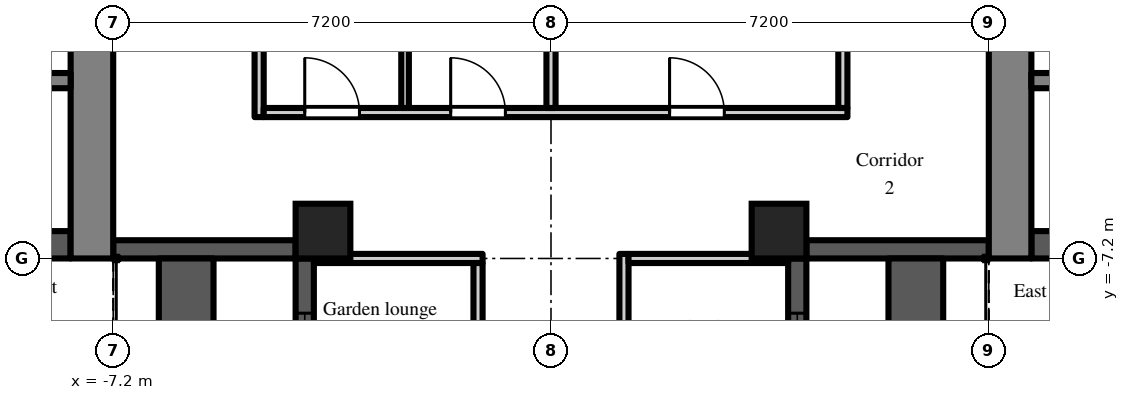
"""IFC4 building model, lengths in metres.
Left out: names, types, materials, properties, quantities, classifications, styles, units other than length and angle.
Written with IfcOpenShell. Run it as: python <this file> out.ifc"""

import sys

from ifc_helpers import new_model, si_unit, direction, frame, frame_2d, origin, origin_2d, place, context, subcontext, project, spatial, rectangle, extrude, element, fill, save


model = new_model("IFC4")
c1 = context("Model", 3, precision=1e-05, world=origin(), true_north=direction((0.0, 1.0)))
c2 = subcontext(c1, "Body", "Model", "MODEL_VIEW")
j1 = project(units=[si_unit("LENGTHUNIT", "METRE"), si_unit("PLANEANGLEUNIT", "RADIAN")], contexts=[c1])
p1 = place(None, origin())
s1 = spatial("IfcSite", under=j1, at=p1, CompositionType="ELEMENT")
p2 = place(p1, origin())
s2 = spatial("IfcBuilding", under=s1, at=p2, CompositionType="ELEMENT")
p3 = place(p2, frame((0.0, 0.0, 159.3)))
s3 = spatial("IfcBuildingStorey", under=s2, at=p3, CompositionType="ELEMENT", Elevation=159.3)
for number, where, z_axis, x_axis in (
    (1, (-3.75, -6.75, 0.0), (0.0, 0.0, 1.0), (1.0, 0.0, 0.0)),
    (2, (3.75, -6.75, 0.0), (0.0, 0.0, 1.0), (1.0, 0.0, 0.0)),
):
    element("IfcColumn", number, at=place(p3, frame(where, z_axis=z_axis, x_axis=x_axis)), inside=s3, PredefinedType="COLUMN", context=c2, shape_type="SweptSolid", body=[
        extrude(rectangle(XDim=0.9, YDim=0.9, at=origin_2d()), origin(), (0.0, 0.0, 1.0), 3.0),
    ])
p4 = place(p3, frame((-7.2, -7.05, 0.0), z_axis=(0.0, 0.0, 1.0), x_axis=(1.0, 0.0, 0.0)))
e3 = element("IfcWall", 3, at=p4, inside=s3, PredefinedType="SOLIDWALL", context=c2, shape_type="SweptSolid", body=[
    extrude(rectangle(XDim=3.0, YDim=0.3, at=frame_2d((1.5, 0.0))), origin(), (0.0, 0.0, 1.0), 2.55),
])
p5 = place(p3, frame((-4.05, -7.2, 0.0), z_axis=(0.0, 0.0, 1.0), x_axis=(0.0, -1.0, 0.0)))
e4 = element("IfcWall", 4, at=p5, inside=s3, PredefinedType="SOLIDWALL", context=c2, shape_type="SweptSolid", body=[
    extrude(rectangle(XDim=7.2, YDim=0.3, at=frame_2d((3.6, 0.0))), origin(), (0.0, 0.0, 1.0), 2.55),
])
p6 = place(p5, frame((3.0, 0.0, 0.0)))
e5 = element("IfcOpeningElement", 5, at=p6, cuts=e4, PredefinedType="OPENING", context=c2, shape_type="SweptSolid", body=[
    extrude(rectangle(XDim=1.2, YDim=2.05, at=frame_2d((0.6, 1.025))), frame((0.0, 0.16, 0.0), z_axis=(0.0, -1.0, 0.0), x_axis=(1.0, 0.0, 0.0)), (0.0, 0.0, 1.0), 0.32),
])
p7 = place(p5, frame((0.9, 0.0, 0.2)))
e6 = element("IfcOpeningElement", 6, at=p7, cuts=e4, PredefinedType="OPENING", context=c2, shape_type="SweptSolid", body=[
    extrude(rectangle(XDim=1.8, YDim=1.85, at=frame_2d((0.9, 0.925))), frame((0.0, 0.16, 0.0), z_axis=(0.0, -1.0, 0.0), x_axis=(1.0, 0.0, 0.0)), (0.0, 0.0, 1.0), 0.32),
])
p8 = place(p5, frame((4.5, 0.0, 0.2)))
e7 = element("IfcOpeningElement", 7, at=p8, cuts=e4, PredefinedType="OPENING", context=c2, shape_type="SweptSolid", body=[
    extrude(rectangle(XDim=1.8, YDim=1.85, at=frame_2d((0.9, 0.925))), frame((0.0, 0.16, 0.0), z_axis=(0.0, -1.0, 0.0), x_axis=(1.0, 0.0, 0.0)), (0.0, 0.0, 1.0), 0.32),
])
p9 = place(p3, frame((4.05, -14.4, 0.0), z_axis=(0.0, 0.0, 1.0), x_axis=(0.0, 1.0, 0.0)))
e8 = element("IfcWall", 8, at=p9, inside=s3, PredefinedType="SOLIDWALL", context=c2, shape_type="SweptSolid", body=[
    extrude(rectangle(XDim=7.2, YDim=0.3, at=frame_2d((3.6, 0.0))), origin(), (0.0, 0.0, 1.0), 2.55),
])
p10 = place(p9, frame((3.0, 0.0, 0.0)))
e9 = element("IfcOpeningElement", 9, at=p10, cuts=e8, PredefinedType="OPENING", context=c2, shape_type="SweptSolid", body=[
    extrude(rectangle(XDim=1.2, YDim=2.05, at=frame_2d((0.6, 1.025))), frame((0.0, 0.16, 0.0), z_axis=(0.0, -1.0, 0.0), x_axis=(1.0, 0.0, 0.0)), (0.0, 0.0, 1.0), 0.32),
])
p11 = place(p9, frame((0.9, 0.0, 0.2)))
e10 = element("IfcOpeningElement", 10, at=p11, cuts=e8, PredefinedType="OPENING", context=c2, shape_type="SweptSolid", body=[
    extrude(rectangle(XDim=1.8, YDim=1.85, at=frame_2d((0.9, 0.925))), frame((0.0, 0.16, 0.0), z_axis=(0.0, -1.0, 0.0), x_axis=(1.0, 0.0, 0.0)), (0.0, 0.0, 1.0), 0.32),
])
p12 = place(p9, frame((4.5, 0.0, 0.2)))
e11 = element("IfcOpeningElement", 11, at=p12, cuts=e8, PredefinedType="OPENING", context=c2, shape_type="SweptSolid", body=[
    extrude(rectangle(XDim=1.8, YDim=1.85, at=frame_2d((0.9, 0.925))), frame((0.0, 0.16, 0.0), z_axis=(0.0, -1.0, 0.0), x_axis=(1.0, 0.0, 0.0)), (0.0, 0.0, 1.0), 0.32),
])
p13 = place(p3, frame((4.2, -7.05, 0.0), z_axis=(0.0, 0.0, 1.0), x_axis=(1.0, 0.0, 0.0)))
e12 = element("IfcWall", 12, at=p13, inside=s3, PredefinedType="SOLIDWALL", context=c2, shape_type="SweptSolid", body=[
    extrude(rectangle(XDim=3.0, YDim=0.3, at=frame_2d((1.5, 0.0))), origin(), (0.0, 0.0, 1.0), 2.55),
])
for number, where, z_axis, x_axis in (
    (13, (6.0, -14.4, 0.0), (0.0, 0.0, 1.0), (0.0, 1.0, 0.0)),
    (14, (-6.0, -14.4, 0.0), (0.0, 0.0, 1.0), (0.0, 1.0, 0.0)),
):
    element("IfcWall", number, at=place(p3, frame(where, z_axis=z_axis, x_axis=x_axis)), inside=s3, PredefinedType="PARAPET", context=c2, shape_type="SweptSolid", body=[
        extrude(rectangle(XDim=7.2, YDim=0.9, at=frame_2d((3.6, 0.0))), origin(), (0.0, 0.0, 1.0), 0.8),
    ])
p14 = place(p3, frame((7.55, -7.2, 0.0), z_axis=(0.0, 0.0, 1.0), x_axis=(0.0, 1.0, 0.0)))
e15 = element("IfcWall", 15, at=p14, inside=s3, PredefinedType="SHEAR", context=c2, shape_type="SweptSolid", body=[
    extrude(rectangle(XDim=14.4, YDim=0.7, at=frame_2d((7.2, 0.0))), origin(), (0.0, 0.0, 1.0), 2.55),
])
p15 = place(p14, frame((6.0, 0.0, 0.0)))
e16 = element("IfcOpeningElement", 16, at=p15, cuts=e15, PredefinedType="OPENING", context=c2, shape_type="SweptSolid", body=[
    extrude(rectangle(XDim=2.4, YDim=2.2, at=frame_2d((1.2, 1.1))), frame((0.0, 0.36, 0.0), z_axis=(0.0, -1.0, 0.0), x_axis=(1.0, 0.0, 0.0)), (0.0, 0.0, 1.0), 0.72),
])
p16 = place(p3, frame((7.9, -6.975, 0.0), z_axis=(0.0, 0.0, 1.0), x_axis=(1.0, 0.0, 0.0)))
e17 = element("IfcWall", 17, at=p16, inside=s3, PredefinedType="SHEAR", context=c2, shape_type="SweptSolid", body=[
    extrude(rectangle(XDim=12.95, YDim=0.45, at=frame_2d((6.475, 0.0))), origin(), (0.0, 0.0, 1.0), 2.55),
])
p17 = place(p3, frame((7.9, -4.275, 0.0), z_axis=(0.0, 0.0, 1.0), x_axis=(1.0, 0.0, 0.0)))
e18 = element("IfcWall", 18, at=p17, inside=s3, PredefinedType="SHEAR", context=c2, shape_type="SweptSolid", body=[
    extrude(rectangle(XDim=1.95, YDim=0.25, at=frame_2d((0.975, 0.0))), origin(), (0.0, 0.0, 1.0), 2.55),
])
p18 = place(p3, frame((-7.55, -7.2, 0.0), z_axis=(0.0, 0.0, 1.0), x_axis=(0.0, 1.0, 0.0)))
e19 = element("IfcWall", 19, at=p18, inside=s3, PredefinedType="SHEAR", context=c2, shape_type="SweptSolid", body=[
    extrude(rectangle(XDim=14.4, YDim=0.7, at=frame_2d((7.2, 0.0))), origin(), (0.0, 0.0, 1.0), 2.55),
])
p19 = place(p18, frame((6.0, 0.0, 0.0)))
e20 = element("IfcOpeningElement", 20, at=p19, cuts=e19, PredefinedType="OPENING", context=c2, shape_type="SweptSolid", body=[
    extrude(rectangle(XDim=2.4, YDim=2.2, at=frame_2d((1.2, 1.1))), frame((0.0, 0.36, 0.0), z_axis=(0.0, -1.0, 0.0), x_axis=(1.0, 0.0, 0.0)), (0.0, 0.0, 1.0), 0.72),
])
p20 = place(p3, frame((-7.9, -6.975, 0.0), z_axis=(0.0, 0.0, 1.0), x_axis=(-1.0, 0.0, 0.0)))
e21 = element("IfcWall", 21, at=p20, inside=s3, PredefinedType="SHEAR", context=c2, shape_type="SweptSolid", body=[
    extrude(rectangle(XDim=12.95, YDim=0.45, at=frame_2d((6.475, 0.0))), origin(), (0.0, 0.0, 1.0), 2.55),
])
p21 = place(p3, frame((-7.9, -4.275, 0.0), z_axis=(0.0, 0.0, 1.0), x_axis=(-1.0, 0.0, 0.0)))
e22 = element("IfcWall", 22, at=p21, inside=s3, PredefinedType="SHEAR", context=c2, shape_type="SweptSolid", body=[
    extrude(rectangle(XDim=1.95, YDim=0.25, at=frame_2d((0.975, 0.0))), origin(), (0.0, 0.0, 1.0), 2.55),
])
p22 = place(p3, frame((-4.8, -4.875, 0.0), z_axis=(0.0, 0.0, 1.0), x_axis=(0.0, 1.0, 0.0)))
e23 = element("IfcWall", 23, at=p22, inside=s3, PredefinedType="PARTITIONING", context=c2, shape_type="SweptSolid", body=[
    extrude(rectangle(XDim=9.75, YDim=0.15, at=frame_2d((4.875, 0.0))), origin(), (0.0, 0.0, 1.0), 2.55),
])
p23 = place(p22, frame((5.575, 0.0, 0.0)))
e24 = element("IfcOpeningElement", 24, at=p23, cuts=e23, PredefinedType="OPENING", context=c2, shape_type="SweptSolid", body=[
    extrude(rectangle(XDim=1.0, YDim=2.1, at=frame_2d((0.5, 1.05))), frame((0.0, 0.085, 0.0), z_axis=(0.0, -1.0, 0.0), x_axis=(1.0, 0.0, 0.0)), (0.0, 0.0, 1.0), 0.17),
])
p24 = place(p3, frame((-4.725, -4.8, 0.0), z_axis=(0.0, 0.0, 1.0), x_axis=(1.0, 0.0, 0.0)))
e25 = element("IfcWall", 25, at=p24, inside=s3, PredefinedType="PARTITIONING", context=c2, shape_type="SweptSolid", body=[
    extrude(rectangle(XDim=9.6, YDim=0.15, at=frame_2d((4.8, 0.0))), origin(), (0.0, 0.0, 1.0), 2.55),
])
p25 = place(p24, frame((0.675, 0.0, 0.0)))
e26 = element("IfcOpeningElement", 26, at=p25, cuts=e25, PredefinedType="OPENING", context=c2, shape_type="SweptSolid", body=[
    extrude(rectangle(XDim=0.9, YDim=2.1, at=frame_2d((0.45, 1.05))), frame((0.0, 0.085, 0.0), z_axis=(0.0, -1.0, 0.0), x_axis=(1.0, 0.0, 0.0)), (0.0, 0.0, 1.0), 0.17),
])
p26 = place(p24, frame((3.075, 0.0, 0.0)))
e27 = element("IfcOpeningElement", 27, at=p26, cuts=e25, PredefinedType="OPENING", context=c2, shape_type="SweptSolid", body=[
    extrude(rectangle(XDim=0.9, YDim=2.1, at=frame_2d((0.45, 1.05))), frame((0.0, 0.085, 0.0), z_axis=(0.0, -1.0, 0.0), x_axis=(1.0, 0.0, 0.0)), (0.0, 0.0, 1.0), 0.17),
])
p27 = place(p24, frame((6.675, 0.0, 0.0)))
e28 = element("IfcOpeningElement", 28, at=p27, cuts=e25, PredefinedType="OPENING", context=c2, shape_type="SweptSolid", body=[
    extrude(rectangle(XDim=0.9, YDim=2.1, at=frame_2d((0.45, 1.05))), frame((0.0, 0.085, 0.0), z_axis=(0.0, -1.0, 0.0), x_axis=(1.0, 0.0, 0.0)), (0.0, 0.0, 1.0), 0.17),
])
p28 = place(p3, frame((-3.9, -7.2, 0.0), z_axis=(0.0, 0.0, 1.0), x_axis=(1.0, 0.0, 0.0)))
e29 = element("IfcWall", 29, at=p28, inside=s3, PredefinedType="PARTITIONING", context=c2, shape_type="SweptSolid", body=[
    extrude(rectangle(XDim=2.775, YDim=0.15, at=frame_2d((1.387, 0.0))), origin(), (0.0, 0.0, 1.0), 2.55),
])
p29 = place(p3, frame((-2.4, -4.725, 0.0), z_axis=(0.0, 0.0, 1.0), x_axis=(0.0, 1.0, 0.0)))
e30 = element("IfcWall", 30, at=p29, inside=s3, PredefinedType="PARTITIONING", context=c2, shape_type="SweptSolid", body=[
    extrude(rectangle(XDim=2.263, YDim=0.125, at=frame_2d((1.131, 0.0))), origin(), (0.0, 0.0, 1.0), 2.55),
])
p30 = place(p3, frame((-1.2, -21.3, 0.0), z_axis=(0.0, 0.0, 1.0), x_axis=(0.0, 1.0, 0.0)))
e31 = element("IfcWall", 31, at=p30, inside=s3, PredefinedType="PARTITIONING", context=c2, shape_type="SweptSolid", body=[
    extrude(rectangle(XDim=14.025, YDim=0.15, at=frame_2d((7.013, 0.0))), origin(), (0.0, 0.0, 1.0), 2.55),
])
p31 = place(p30, frame((7.85, 0.0, 0.0)))
e32 = element("IfcOpeningElement", 32, at=p31, cuts=e31, PredefinedType="OPENING", context=c2, shape_type="SweptSolid", body=[
    extrude(rectangle(XDim=0.9, YDim=2.1, at=frame_2d((0.45, 1.05))), frame((0.0, 0.085, 0.0), z_axis=(0.0, -1.0, 0.0), x_axis=(1.0, 0.0, 0.0)), (0.0, 0.0, 1.0), 0.17),
])
p32 = place(p30, frame((11.45, 0.0, 0.0)))
e33 = element("IfcOpeningElement", 33, at=p32, cuts=e31, PredefinedType="OPENING", context=c2, shape_type="SweptSolid", body=[
    extrude(rectangle(XDim=0.9, YDim=2.1, at=frame_2d((0.45, 1.05))), frame((0.0, 0.085, 0.0), z_axis=(0.0, -1.0, 0.0), x_axis=(1.0, 0.0, 0.0)), (0.0, 0.0, 1.0), 0.17),
])
p33 = place(p30, frame((2.1, 0.0, 0.0)))
e34 = element("IfcOpeningElement", 34, at=p33, cuts=e31, PredefinedType="OPENING", context=c2, shape_type="SweptSolid", body=[
    extrude(rectangle(XDim=1.0, YDim=2.1, at=frame_2d((0.5, 1.05))), frame((0.0, 0.085, 0.0), z_axis=(0.0, -1.0, 0.0), x_axis=(1.0, 0.0, 0.0)), (0.0, 0.0, 1.0), 0.17),
])
p34 = place(p3, frame((0.0, -4.725, 0.0), z_axis=(0.0, 0.0, 1.0), x_axis=(0.0, 1.0, 0.0)))
e35 = element("IfcWall", 35, at=p34, inside=s3, PredefinedType="PARTITIONING", context=c2, shape_type="SweptSolid", body=[
    extrude(rectangle(XDim=2.25, YDim=0.15, at=frame_2d((1.125, 0.0))), origin(), (0.0, 0.0, 1.0), 2.55),
])
p35 = place(p3, frame((1.2, -21.3, 0.0), z_axis=(0.0, 0.0, 1.0), x_axis=(0.0, 1.0, 0.0)))
e36 = element("IfcWall", 36, at=p35, inside=s3, PredefinedType="PARTITIONING", context=c2, shape_type="SweptSolid", body=[
    extrude(rectangle(XDim=14.175, YDim=0.15, at=frame_2d((7.087, 0.0))), origin(), (0.0, 0.0, 1.0), 2.55),
])
p36 = place(p35, frame((8.25, 0.0, 0.0)))
e37 = element("IfcOpeningElement", 37, at=p36, cuts=e36, PredefinedType="OPENING", context=c2, shape_type="SweptSolid", body=[
    extrude(rectangle(XDim=0.9, YDim=2.1, at=frame_2d((0.45, 1.05))), frame((0.0, 0.085, 0.0), z_axis=(0.0, -1.0, 0.0), x_axis=(1.0, 0.0, 0.0)), (0.0, 0.0, 1.0), 0.17),
])
p37 = place(p35, frame((0.2, 0.0, 0.0)))
e38 = element("IfcOpeningElement", 38, at=p37, cuts=e36, PredefinedType="OPENING", context=c2, shape_type="SweptSolid", body=[
    extrude(rectangle(XDim=1.0, YDim=2.1, at=frame_2d((0.5, 1.05))), frame((0.0, 0.085, 0.0), z_axis=(0.0, -1.0, 0.0), x_axis=(1.0, 0.0, 0.0)), (0.0, 0.0, 1.0), 0.17),
])
p38 = place(p3, frame((1.275, -7.2, 0.0), z_axis=(0.0, 0.0, 1.0), x_axis=(1.0, 0.0, 0.0)))
e39 = element("IfcWall", 39, at=p38, inside=s3, PredefinedType="PARTITIONING", context=c2, shape_type="SweptSolid", body=[
    extrude(rectangle(XDim=2.625, YDim=0.15, at=frame_2d((1.312, 0.0))), origin(), (0.0, 0.0, 1.0), 2.55),
])
p39 = place(p3, frame((4.8, -4.725, 0.0), z_axis=(0.0, 0.0, 1.0), x_axis=(0.0, 1.0, 0.0)))
e40 = element("IfcWall", 40, at=p39, inside=s3, PredefinedType="PARTITIONING", context=c2, shape_type="SweptSolid", body=[
    extrude(rectangle(XDim=9.45, YDim=0.15, at=frame_2d((4.725, 0.0))), origin(), (0.0, 0.0, 1.0), 2.55),
])
p40 = place(p39, frame((5.025, 0.0, 0.0)))
e41 = element("IfcOpeningElement", 41, at=p40, cuts=e40, PredefinedType="OPENING", context=c2, shape_type="SweptSolid", body=[
    extrude(rectangle(XDim=1.8, YDim=2.1, at=frame_2d((0.9, 1.05))), frame((0.0, 0.085, 0.0), z_axis=(0.0, -1.0, 0.0), x_axis=(1.0, 0.0, 0.0)), (0.0, 0.0, 1.0), 0.17),
])
p41 = place(p7, origin())
e42 = element("IfcWindow", 42, at=p41, inside=s3, PartitioningType="SINGLE_PANEL", PredefinedType="WINDOW", context=c2, shape_type="SweptSolid", body=[
    extrude(rectangle(XDim=1.8, YDim=1.85, at=frame_2d((0.9, 0.925))), frame((0.0, 0.03, 0.0), z_axis=(0.0, -1.0, 0.0), x_axis=(1.0, 0.0, 0.0)), (0.0, 0.0, 1.0), 0.06),
])
fill(e6, e42)
p42 = place(p12, origin())
e43 = element("IfcWindow", 43, at=p42, inside=s3, PartitioningType="SINGLE_PANEL", PredefinedType="WINDOW", context=c2, shape_type="SweptSolid", body=[
    extrude(rectangle(XDim=1.8, YDim=1.85, at=frame_2d((0.9, 0.925))), frame((0.0, 0.03, 0.0), z_axis=(0.0, -1.0, 0.0), x_axis=(1.0, 0.0, 0.0)), (0.0, 0.0, 1.0), 0.06),
])
fill(e11, e43)
p43 = place(p25, origin())
e44 = element("IfcDoor", 44, at=p43, inside=s3, OperationType="SINGLE_SWING_LEFT", PredefinedType="DOOR", context=c2, shape_type="SweptSolid", body=[
    extrude(rectangle(XDim=0.9, YDim=2.1, at=frame_2d((0.45, 1.05))), frame((0.0, 0.025, 0.0), z_axis=(0.0, -1.0, 0.0), x_axis=(1.0, 0.0, 0.0)), (0.0, 0.0, 1.0), 0.05),
])
fill(e26, e44)
p44 = place(p26, origin())
e45 = element("IfcDoor", 45, at=p44, inside=s3, OperationType="SINGLE_SWING_LEFT", PredefinedType="DOOR", context=c2, shape_type="SweptSolid", body=[
    extrude(rectangle(XDim=0.9, YDim=2.1, at=frame_2d((0.45, 1.05))), frame((0.0, 0.025, 0.0), z_axis=(0.0, -1.0, 0.0), x_axis=(1.0, 0.0, 0.0)), (0.0, 0.0, 1.0), 0.05),
])
fill(e27, e45)
p45 = place(p27, origin())
e46 = element("IfcDoor", 46, at=p45, inside=s3, OperationType="SINGLE_SWING_LEFT", PredefinedType="DOOR", context=c2, shape_type="SweptSolid", body=[
    extrude(rectangle(XDim=0.9, YDim=2.1, at=frame_2d((0.45, 1.05))), frame((0.0, 0.025, 0.0), z_axis=(0.0, -1.0, 0.0), x_axis=(1.0, 0.0, 0.0)), (0.0, 0.0, 1.0), 0.05),
])
fill(e28, e46)
save(model, sys.argv[1])
